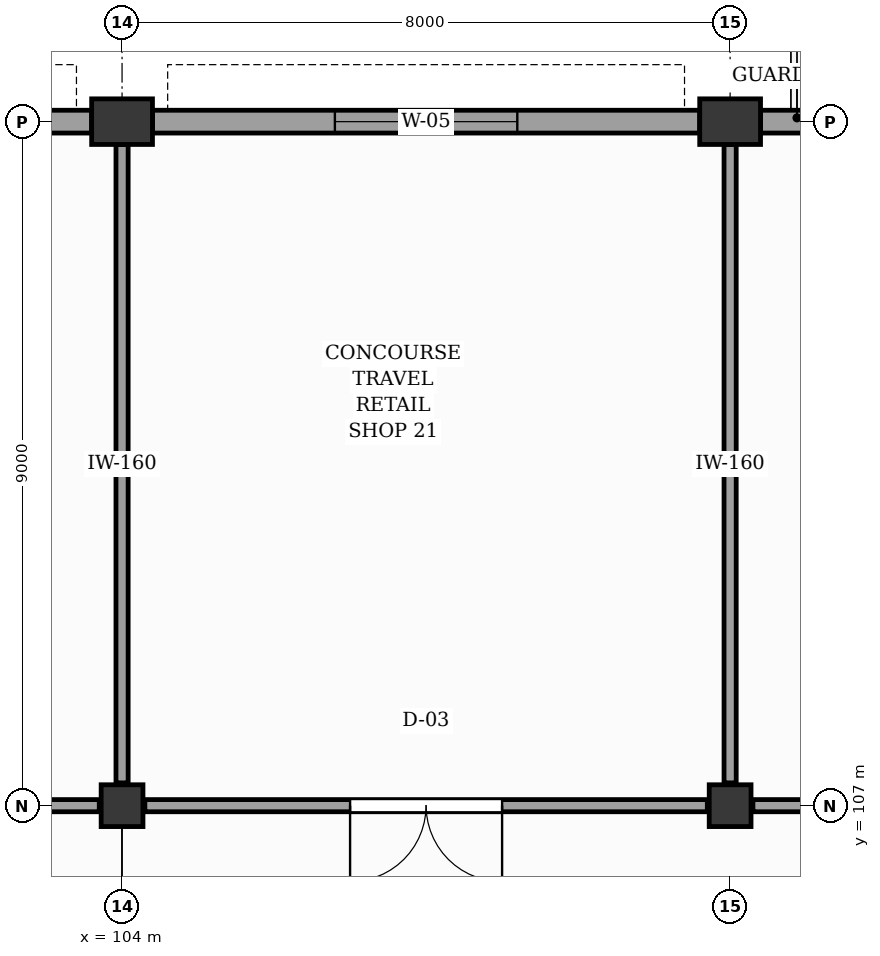
"""IFC4 building model, lengths in metres.
Left out: names, types, materials, properties, quantities, classifications, styles, units other than length and angle.
Written with IfcOpenShell. Run it as: python <this file> out.ifc"""

import sys

from ifc_helpers import new_model, si_unit, direction, frame, frame_2d, origin, origin_2d, place, context, subcontext, project, spatial, rectangle, extrude, element, fill, save


model = new_model("IFC4")
c1 = context("Model", 3, precision=1e-05, world=origin(), true_north=direction((0.0, 1.0)))
c2 = subcontext(c1, "Body", "Model", "MODEL_VIEW")
j1 = project(units=[si_unit("LENGTHUNIT", "METRE"), si_unit("PLANEANGLEUNIT", "RADIAN")], contexts=[c1])
p1 = place(None, origin())
s1 = spatial("IfcSite", under=j1, at=p1, CompositionType="ELEMENT")
p2 = place(p1, origin())
s2 = spatial("IfcBuilding", under=s1, at=p2, CompositionType="ELEMENT")
p3 = place(p2, frame((0.0, 0.0, 9.6)))
s3 = spatial("IfcBuildingStorey", under=s2, at=p3, CompositionType="ELEMENT", Elevation=9.6)
p4 = place(p3, frame((104.0, 107.0, 0.0), z_axis=(0.0, 0.0, 1.0), x_axis=(1.0, 0.0, 0.0)))
e1 = element("IfcColumn", 1, at=p4, inside=s3, PredefinedType="COLUMN", context=c2, shape_type="SweptSolid", body=[
    extrude(rectangle(XDim=0.55, YDim=0.55, at=origin_2d()), origin(), (0.0, 0.0, 1.0), 6.6),
])
p5 = place(p3, frame((104.0, 116.0, 0.0), z_axis=(0.0, 0.0, 1.0), x_axis=(1.0, 0.0, 0.0)))
e2 = element("IfcColumn", 2, at=p5, inside=s3, PredefinedType="PILASTER", context=c2, shape_type="SweptSolid", body=[
    extrude(rectangle(XDim=0.8, YDim=0.6, at=origin_2d()), origin(), (0.0, 0.0, 1.0), 6.6),
])
p6 = place(p3, frame((112.0, 107.0, 0.0), z_axis=(0.0, 0.0, 1.0), x_axis=(1.0, 0.0, 0.0)))
e3 = element("IfcColumn", 3, at=p6, inside=s3, PredefinedType="COLUMN", context=c2, shape_type="SweptSolid", body=[
    extrude(rectangle(XDim=0.55, YDim=0.55, at=origin_2d()), origin(), (0.0, 0.0, 1.0), 6.6),
])
p7 = place(p3, frame((112.0, 116.0, 0.0), z_axis=(0.0, 0.0, 1.0), x_axis=(1.0, 0.0, 0.0)))
e4 = element("IfcColumn", 4, at=p7, inside=s3, PredefinedType="PILASTER", context=c2, shape_type="SweptSolid", body=[
    extrude(rectangle(XDim=0.8, YDim=0.6, at=origin_2d()), origin(), (0.0, 0.0, 1.0), 6.6),
])
p8 = place(p3, frame((96.4, 116.0, 0.0), z_axis=(0.0, 0.0, 1.0), x_axis=(1.0, 0.0, 0.0)))
e5 = element("IfcWall", 5, at=p8, inside=s3, PredefinedType="SOLIDWALL", context=c2, shape_type="SweptSolid", body=[
    extrude(rectangle(XDim=7.2, YDim=0.3, at=frame_2d((3.6, 0.0))), origin(), (0.0, 0.0, 1.0), 5.64),
])
p9 = place(p8, frame((2.4, 0.0, 0.9)))
e6 = element("IfcOpeningElement", 6, at=p9, cuts=e5, PredefinedType="OPENING", context=c2, shape_type="SweptSolid", body=[
    extrude(rectangle(XDim=2.4, YDim=3.2, at=frame_2d((1.2, 1.6))), frame((0.0, 0.16, 0.0), z_axis=(0.0, -1.0, 0.0), x_axis=(1.0, 0.0, 0.0)), (0.0, 0.0, 1.0), 0.32),
])
p10 = place(p3, frame((104.4, 116.0, 0.0), z_axis=(0.0, 0.0, 1.0), x_axis=(1.0, 0.0, 0.0)))
e7 = element("IfcWall", 7, at=p10, inside=s3, PredefinedType="SOLIDWALL", context=c2, shape_type="SweptSolid", body=[
    extrude(rectangle(XDim=7.2, YDim=0.3, at=frame_2d((3.6, 0.0))), origin(), (0.0, 0.0, 1.0), 5.64),
])
p11 = place(p10, frame((2.4, 0.0, 0.9)))
e8 = element("IfcOpeningElement", 8, at=p11, cuts=e7, PredefinedType="OPENING", context=c2, shape_type="SweptSolid", body=[
    extrude(rectangle(XDim=2.4, YDim=3.2, at=frame_2d((1.2, 1.6))), frame((0.0, 0.16, 0.0), z_axis=(0.0, -1.0, 0.0), x_axis=(1.0, 0.0, 0.0)), (0.0, 0.0, 1.0), 0.32),
])
p12 = place(p3, frame((112.4, 116.0, 0.0), z_axis=(0.0, 0.0, 1.0), x_axis=(1.0, 0.0, 0.0)))
e9 = element("IfcWall", 9, at=p12, inside=s3, PredefinedType="SOLIDWALL", context=c2, shape_type="SweptSolid", body=[
    extrude(rectangle(XDim=7.2, YDim=0.3, at=frame_2d((3.6, 0.0))), origin(), (0.0, 0.0, 1.0), 5.24),
])
p13 = place(p12, frame((2.7, 0.0, 0.0)))
e10 = element("IfcOpeningElement", 10, at=p13, cuts=e9, PredefinedType="OPENING", context=c2, shape_type="SweptSolid", body=[
    extrude(rectangle(XDim=1.8, YDim=2.2, at=frame_2d((0.9, 1.1))), frame((0.0, 0.16, 0.0), z_axis=(0.0, -1.0, 0.0), x_axis=(1.0, 0.0, 0.0)), (0.0, 0.0, 1.0), 0.32),
])
p14 = place(p3, frame((96.3, 107.0, 0.0), z_axis=(0.0, 0.0, 1.0), x_axis=(1.0, 0.0, 0.0)))
e11 = element("IfcWall", 11, at=p14, inside=s3, PredefinedType="PARTITIONING", context=c2, shape_type="SweptSolid", body=[
    extrude(rectangle(XDim=7.4, YDim=0.16, at=frame_2d((3.7, 0.0))), origin(), (0.0, 0.0, 1.0), 5.5),
])
p15 = place(p14, frame((2.8, 0.0, 0.0)))
e12 = element("IfcOpeningElement", 12, at=p15, cuts=e11, PredefinedType="OPENING", context=c2, shape_type="SweptSolid", body=[
    extrude(rectangle(XDim=1.8, YDim=2.25, at=frame_2d((0.9, 1.125))), frame((0.0, 0.09, 0.0), z_axis=(0.0, -1.0, 0.0), x_axis=(1.0, 0.0, 0.0)), (0.0, 0.0, 1.0), 0.18),
])
p16 = place(p3, frame((104.0, 107.3, 0.0), z_axis=(0.0, 0.0, 1.0), x_axis=(0.0, 1.0, 0.0)))
e13 = element("IfcWall", 13, at=p16, inside=s3, PredefinedType="PARTITIONING", context=c2, shape_type="SweptSolid", body=[
    extrude(rectangle(XDim=8.4, YDim=0.16, at=frame_2d((4.2, 0.0))), origin(), (0.0, 0.0, 1.0), 5.5),
])
p17 = place(p3, frame((104.3, 107.0, 0.0), z_axis=(0.0, 0.0, 1.0), x_axis=(1.0, 0.0, 0.0)))
e14 = element("IfcWall", 14, at=p17, inside=s3, PredefinedType="PARTITIONING", context=c2, shape_type="SweptSolid", body=[
    extrude(rectangle(XDim=7.4, YDim=0.16, at=frame_2d((3.7, 0.0))), origin(), (0.0, 0.0, 1.0), 5.5),
])
p18 = place(p17, frame((2.7, 0.0, 0.0)))
e15 = element("IfcOpeningElement", 15, at=p18, cuts=e14, PredefinedType="OPENING", context=c2, shape_type="SweptSolid", body=[
    extrude(rectangle(XDim=2.0, YDim=2.3, at=frame_2d((1.0, 1.15))), frame((0.0, 0.09, 0.0), z_axis=(0.0, -1.0, 0.0), x_axis=(1.0, 0.0, 0.0)), (0.0, 0.0, 1.0), 0.18),
])
p19 = place(p3, frame((112.0, 107.3, 0.0), z_axis=(0.0, 0.0, 1.0), x_axis=(0.0, 1.0, 0.0)))
e16 = element("IfcWall", 16, at=p19, inside=s3, PredefinedType="PARTITIONING", context=c2, shape_type="SweptSolid", body=[
    extrude(rectangle(XDim=8.4, YDim=0.16, at=frame_2d((4.2, 0.0))), origin(), (0.0, 0.0, 1.0), 5.5),
])
p20 = place(p3, frame((112.3, 107.0, 0.0), z_axis=(0.0, 0.0, 1.0), x_axis=(1.0, 0.0, 0.0)))
e17 = element("IfcWall", 17, at=p20, inside=s3, PredefinedType="PARTITIONING", context=c2, shape_type="SweptSolid", body=[
    extrude(rectangle(XDim=7.4, YDim=0.16, at=frame_2d((3.7, 0.0))), origin(), (0.0, 0.0, 1.0), 4.83),
])
p21 = place(p20, frame((2.7, 0.0, 0.0)))
e18 = element("IfcOpeningElement", 18, at=p21, cuts=e17, PredefinedType="OPENING", context=c2, shape_type="SweptSolid", body=[
    extrude(rectangle(XDim=2.0, YDim=2.3, at=frame_2d((1.0, 1.15))), frame((0.0, 0.09, 0.0), z_axis=(0.0, -1.0, 0.0), x_axis=(1.0, 0.0, 0.0)), (0.0, 0.0, 1.0), 0.18),
])
p22 = place(p11, origin())
e19 = element("IfcWindow", 19, at=p22, inside=s3, PartitioningType="SINGLE_PANEL", PredefinedType="WINDOW", context=c2, shape_type="SweptSolid", body=[
    extrude(rectangle(XDim=2.4, YDim=3.2, at=frame_2d((1.2, 1.6))), frame((0.0, 0.03, 0.0), z_axis=(0.0, -1.0, 0.0), x_axis=(1.0, 0.0, 0.0)), (0.0, 0.0, 1.0), 0.06),
])
fill(e8, e19)
p23 = place(p18, frame((2.0, 0.0, 0.0), z_axis=(0.0, 0.0, 1.0), x_axis=(-1.0, 0.0, 0.0)))
e20 = element("IfcDoor", 20, at=p23, inside=s3, OperationType="DOUBLE_DOOR_SINGLE_SWING", PredefinedType="DOOR", context=c2, shape_type="SweptSolid", body=[
    extrude(rectangle(XDim=2.0, YDim=2.3, at=frame_2d((1.0, 1.15))), frame((0.0, 0.025, 0.0), z_axis=(0.0, -1.0, 0.0), x_axis=(1.0, 0.0, 0.0)), (0.0, 0.0, 1.0), 0.05),
])
fill(e15, e20)
save(model, sys.argv[1])
